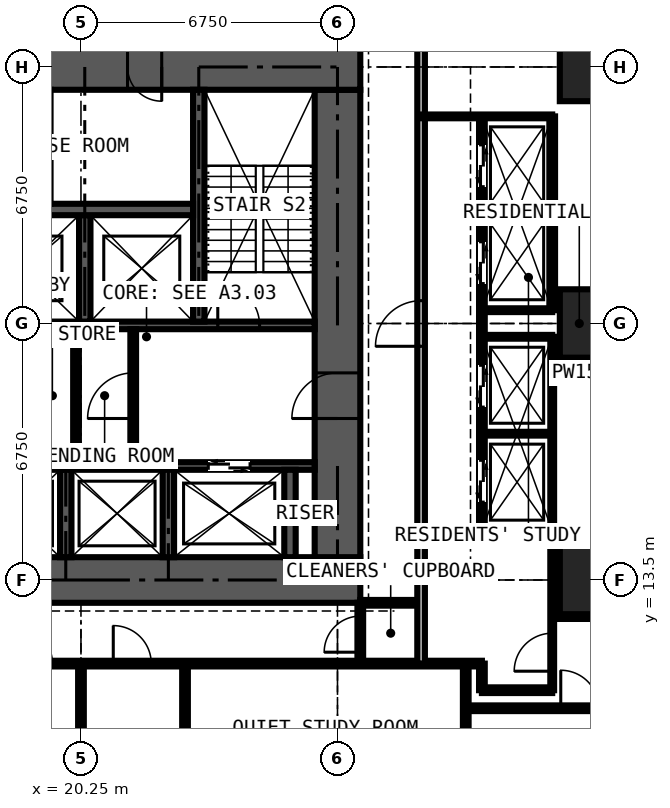
"""IFC4 building model, lengths in metres.
Left out: names, types, materials, properties, quantities, classifications, styles, units other than length and angle.
Written with IfcOpenShell. Run it as: python <this file> out.ifc"""

import sys

from ifc_helpers import new_model, si_unit, direction, frame, frame_2d, origin, origin_2d, place, context, subcontext, project, spatial, rectangle, extrude, element, fill, save


model = new_model("IFC4")
c1 = context("Model", 3, precision=1e-05, world=origin(), true_north=direction((0.0, 1.0)))
c2 = subcontext(c1, "Body", "Model", "MODEL_VIEW")
j1 = project(units=[si_unit("LENGTHUNIT", "METRE"), si_unit("PLANEANGLEUNIT", "RADIAN")], contexts=[c1])
p1 = place(None, origin())
s1 = spatial("IfcSite", under=j1, at=p1, CompositionType="ELEMENT")
p2 = place(p1, origin())
s2 = spatial("IfcBuilding", under=s1, at=p2, CompositionType="ELEMENT")
p3 = place(p2, frame((0.0, 0.0, 57.6)))
s3 = spatial("IfcBuildingStorey", under=s2, at=p3, CompositionType="ELEMENT", Elevation=57.6)
for number, where, z_axis, x_axis in (
    (1, (33.75, 13.5, 0.0), (0.0, 0.0, 1.0), (1.0, 0.0, 0.0)),
    (2, (33.75, 20.25, 0.0), (0.0, 0.0, 1.0), (1.0, 0.0, 0.0)),
    (3, (33.75, 27.0, 0.0), (0.0, 0.0, 1.0), (1.0, 0.0, 0.0)),
):
    element("IfcColumn", number, at=place(p3, frame(where, z_axis=z_axis, x_axis=x_axis)), inside=s3, PredefinedType="COLUMN", context=c2, shape_type="SweptSolid", body=[
        extrude(rectangle(XDim=1.8, YDim=1.8, at=origin_2d()), origin(), (0.0, 0.0, 1.0), 3.6),
    ])
p4 = place(p3, frame((12.9, 13.5, 0.0), z_axis=(0.0, 0.0, 1.0), x_axis=(1.0, 0.0, 0.0)))
e4 = element("IfcWall", 4, at=p4, inside=s3, PredefinedType="SHEAR", context=c2, shape_type="SweptSolid", body=[
    extrude(rectangle(XDim=14.7, YDim=1.2, at=frame_2d((7.35, 0.0))), origin(), (0.0, 0.0, 1.0), 3.6),
])
p5 = place(p3, frame((27.0, 14.1, 0.0), z_axis=(0.0, 0.0, 1.0), x_axis=(0.0, 1.0, 0.0)))
e5 = element("IfcWall", 5, at=p5, inside=s3, PredefinedType="SHEAR", context=c2, shape_type="SweptSolid", body=[
    extrude(rectangle(XDim=12.3, YDim=1.2, at=frame_2d((6.15, 0.0))), origin(), (0.0, 0.0, 1.0), 3.6),
])
p6 = place(p5, frame((3.65, 0.0, 0.0)))
e6 = element("IfcOpeningElement", 6, at=p6, cuts=e5, PredefinedType="OPENING", context=c2, shape_type="SweptSolid", body=[
    extrude(rectangle(XDim=1.2, YDim=2.2, at=frame_2d((0.6, 1.1))), frame((0.0, 0.61, 0.0), z_axis=(0.0, -1.0, 0.0), x_axis=(1.0, 0.0, 0.0)), (0.0, 0.0, 1.0), 1.22),
])
p7 = place(p3, frame((27.6, 27.0, 0.0), z_axis=(0.0, 0.0, 1.0), x_axis=(-1.0, 0.0, 0.0)))
e7 = element("IfcWall", 7, at=p7, inside=s3, PredefinedType="SHEAR", context=c2, shape_type="SweptSolid", body=[
    extrude(rectangle(XDim=14.7, YDim=1.2, at=frame_2d((7.35, 0.0))), origin(), (0.0, 0.0, 1.0), 3.6),
])
p8 = place(p7, frame((5.225, 0.0, 0.0)))
e8 = element("IfcOpeningElement", 8, at=p8, cuts=e7, PredefinedType="OPENING", context=c2, shape_type="SweptSolid", body=[
    extrude(rectangle(XDim=0.9, YDim=2.2, at=frame_2d((0.45, 1.1))), frame((0.0, 0.61, 0.0), z_axis=(0.0, -1.0, 0.0), x_axis=(1.0, 0.0, 0.0)), (0.0, 0.0, 1.0), 1.22),
])
p9 = place(p7, frame((8.2, 0.0, 0.0)))
e9 = element("IfcOpeningElement", 9, at=p9, cuts=e7, PredefinedType="OPENING", context=c2, shape_type="SweptSolid", body=[
    extrude(rectangle(XDim=1.0, YDim=2.2, at=frame_2d((0.5, 1.1))), frame((0.0, 0.61, 0.0), z_axis=(0.0, -1.0, 0.0), x_axis=(1.0, 0.0, 0.0)), (0.0, 0.0, 1.0), 1.22),
])
p10 = place(p3, frame((14.1, 16.5, 0.0), z_axis=(0.0, 0.0, 1.0), x_axis=(1.0, 0.0, 0.0)))
e10 = element("IfcWall", 10, at=p10, inside=s3, PredefinedType="SHEAR", context=c2, shape_type="SweptSolid", body=[
    extrude(rectangle(XDim=12.3, YDim=0.2, at=frame_2d((6.15, 0.0))), origin(), (0.0, 0.0, 1.0), 3.6),
])
p11 = place(p10, frame((0.9, 0.0, 0.0)))
e11 = element("IfcOpeningElement", 11, at=p11, cuts=e10, PredefinedType="OPENING", context=c2, shape_type="SweptSolid", body=[
    extrude(rectangle(XDim=1.1, YDim=2.2, at=frame_2d((0.55, 1.1))), frame((0.0, 0.11, 0.0), z_axis=(0.0, -1.0, 0.0), x_axis=(1.0, 0.0, 0.0)), (0.0, 0.0, 1.0), 0.22),
])
p12 = place(p10, frame((9.5, 0.0, 0.0)))
e12 = element("IfcOpeningElement", 12, at=p12, cuts=e10, PredefinedType="OPENING", context=c2, shape_type="SweptSolid", body=[
    extrude(rectangle(XDim=1.1, YDim=2.2, at=frame_2d((0.55, 1.1))), frame((0.0, 0.11, 0.0), z_axis=(0.0, -1.0, 0.0), x_axis=(1.0, 0.0, 0.0)), (0.0, 0.0, 1.0), 0.22),
])
p13 = place(p3, frame((14.1, 20.2, 0.0), z_axis=(0.0, 0.0, 1.0), x_axis=(1.0, 0.0, 0.0)))
e13 = element("IfcWall", 13, at=p13, inside=s3, PredefinedType="SHEAR", context=c2, shape_type="SweptSolid", body=[
    extrude(rectangle(XDim=12.3, YDim=0.2, at=frame_2d((6.15, 0.0))), origin(), (0.0, 0.0, 1.0), 3.6),
])
p14 = place(p13, frame((0.35, 0.0, 0.0)))
e14 = element("IfcOpeningElement", 14, at=p14, cuts=e13, PredefinedType="OPENING", context=c2, shape_type="SweptSolid", body=[
    extrude(rectangle(XDim=1.1, YDim=2.2, at=frame_2d((0.55, 1.1))), frame((0.0, 0.11, 0.0), z_axis=(0.0, -1.0, 0.0), x_axis=(1.0, 0.0, 0.0)), (0.0, 0.0, 1.0), 0.22),
])
p15 = place(p13, frame((9.75, 0.0, 0.0)))
e15 = element("IfcOpeningElement", 15, at=p15, cuts=e13, PredefinedType="OPENING", context=c2, shape_type="SweptSolid", body=[
    extrude(rectangle(XDim=1.1, YDim=2.2, at=frame_2d((0.55, 1.1))), frame((0.0, 0.11, 0.0), z_axis=(0.0, -1.0, 0.0), x_axis=(1.0, 0.0, 0.0)), (0.0, 0.0, 1.0), 0.22),
])
p16 = place(p3, frame((23.35, 20.3, 0.0), z_axis=(0.0, 0.0, 1.0), x_axis=(0.0, 1.0, 0.0)))
e16 = element("IfcWall", 16, at=p16, inside=s3, PredefinedType="SHEAR", context=c2, shape_type="SweptSolid", body=[
    extrude(rectangle(XDim=6.1, YDim=0.3, at=frame_2d((3.05, 0.0))), origin(), (0.0, 0.0, 1.0), 3.6),
])
p17 = place(p3, frame((20.35, 20.3, 0.0), z_axis=(0.0, 0.0, 1.0), x_axis=(0.0, 1.0, 0.0)))
e17 = element("IfcWall", 17, at=p17, inside=s3, PredefinedType="SHEAR", context=c2, shape_type="SweptSolid", body=[
    extrude(rectangle(XDim=2.8, YDim=0.3, at=frame_2d((1.4, 0.0))), origin(), (0.0, 0.0, 1.0), 3.6),
])
p18 = place(p3, frame((17.3, 23.25, 0.0), z_axis=(0.0, 0.0, 1.0), x_axis=(1.0, 0.0, 0.0)))
e18 = element("IfcWall", 18, at=p18, inside=s3, PredefinedType="SHEAR", context=c2, shape_type="SweptSolid", body=[
    extrude(rectangle(XDim=5.9, YDim=0.3, at=frame_2d((2.95, 0.0))), origin(), (0.0, 0.0, 1.0), 3.6),
])
for number, where, z_axis, x_axis in (
    (19, (19.85, 14.1, 0.0), (0.0, 0.0, 1.0), (0.0, 1.0, 0.0)),
    (20, (22.55, 14.1, 0.0), (0.0, 0.0, 1.0), (0.0, 1.0, 0.0)),
    (21, (25.75, 14.1, 0.0), (0.0, 0.0, 1.0), (0.0, 1.0, 0.0)),
):
    element("IfcWall", number, at=place(p3, frame(where, z_axis=z_axis, x_axis=x_axis)), inside=s3, PredefinedType="SHEAR", context=c2, shape_type="SweptSolid", body=[
        extrude(rectangle(XDim=2.3, YDim=0.3, at=frame_2d((1.15, 0.0))), origin(), (0.0, 0.0, 1.0), 3.6),
    ])
p19 = place(p3, frame((21.625, 16.6, 0.0), z_axis=(0.0, 0.0, 1.0), x_axis=(0.0, 1.0, 0.0)))
e22 = element("IfcWall", 22, at=p19, inside=s3, PredefinedType="PARTITIONING", context=c2, shape_type="SweptSolid", body=[
    extrude(rectangle(XDim=3.5, YDim=0.15, at=frame_2d((1.75, 0.0))), origin(), (0.0, 0.0, 1.0), 3.375),
])
p20 = place(p19, frame((1.15, 0.0, 0.0)))
e23 = element("IfcOpeningElement", 23, at=p20, cuts=e22, PredefinedType="OPENING", context=c2, shape_type="SweptSolid", body=[
    extrude(rectangle(XDim=1.2, YDim=2.2, at=frame_2d((0.6, 1.1))), frame((0.0, 0.085, 0.0), z_axis=(0.0, -1.0, 0.0), x_axis=(1.0, 0.0, 0.0)), (0.0, 0.0, 1.0), 0.17),
])
p21 = place(p3, frame((20.12, 16.6, 0.0), z_axis=(0.0, 0.0, 1.0), x_axis=(0.0, 1.0, 0.0)))
e24 = element("IfcWall", 24, at=p21, inside=s3, PredefinedType="PARTITIONING", context=c2, shape_type="SweptSolid", body=[
    extrude(rectangle(XDim=3.5, YDim=0.15, at=frame_2d((1.75, 0.0))), origin(), (0.0, 0.0, 1.0), 3.375),
])
p22 = place(p3, frame((10.125, 11.3, 0.0), z_axis=(0.0, 0.0, 1.0), x_axis=(1.0, 0.0, 0.0)))
e25 = element("IfcWall", 25, at=p22, inside=s3, PredefinedType="PARTITIONING", context=c2, shape_type="SweptSolid", body=[
    extrude(rectangle(XDim=20.675, YDim=0.15, at=frame_2d((10.337, 0.0))), origin(), (0.0, 0.0, 1.0), 3.375),
])
p23 = place(p22, frame((8.375, 0.0, 0.0)))
e26 = element("IfcOpeningElement", 26, at=p23, cuts=e25, PredefinedType="OPENING", context=c2, shape_type="SweptSolid", body=[
    extrude(rectangle(XDim=1.0, YDim=2.2, at=frame_2d((0.5, 1.1))), frame((0.0, 0.085, 0.0), z_axis=(0.0, -1.0, 0.0), x_axis=(1.0, 0.0, 0.0)), (0.0, 0.0, 1.0), 0.17),
])
p24 = place(p22, frame((10.975, 0.0, 0.0)))
e27 = element("IfcOpeningElement", 27, at=p24, cuts=e25, PredefinedType="OPENING", context=c2, shape_type="SweptSolid", body=[
    extrude(rectangle(XDim=1.0, YDim=2.2, at=frame_2d((0.5, 1.1))), frame((0.0, 0.085, 0.0), z_axis=(0.0, -1.0, 0.0), x_axis=(1.0, 0.0, 0.0)), (0.0, 0.0, 1.0), 0.17),
])
p25 = place(p22, frame((3.925, 0.0, 0.0)))
e28 = element("IfcOpeningElement", 28, at=p25, cuts=e25, PredefinedType="OPENING", context=c2, shape_type="SweptSolid", body=[
    extrude(rectangle(XDim=0.95, YDim=2.2, at=frame_2d((0.475, 1.1))), frame((0.0, 0.085, 0.0), z_axis=(0.0, -1.0, 0.0), x_axis=(1.0, 0.0, 0.0)), (0.0, 0.0, 1.0), 0.17),
])
p26 = place(p3, frame((20.25, -0.734, 0.0), z_axis=(0.0, 0.0, 1.0), x_axis=(0.0, 1.0, 0.0)))
e29 = element("IfcWall", 29, at=p26, inside=s3, PredefinedType="PARTITIONING", context=c2, shape_type="SweptSolid", body=[
    extrude(rectangle(XDim=12.034, YDim=0.15, at=frame_2d((6.017, 0.0))), origin(), (0.0, 0.0, 1.0), 2.61),
])
p27 = place(p3, frame((22.988, 5.65, 0.0), z_axis=(0.0, 0.0, 1.0), x_axis=(0.0, 1.0, 0.0)))
e30 = element("IfcWall", 30, at=p27, inside=s3, PredefinedType="PARTITIONING", context=c2, shape_type="SweptSolid", body=[
    extrude(rectangle(XDim=5.65, YDim=0.15, at=frame_2d((2.825, 0.0))), origin(), (0.0, 0.0, 1.0), 3.375),
])
p28 = place(p3, frame((27.6, 11.3, 0.0), z_axis=(0.0, 0.0, 1.0), x_axis=(0.0, 1.0, 0.0)))
e31 = element("IfcWall", 31, at=p28, inside=s3, PredefinedType="PARTITIONING", context=c2, shape_type="SweptSolid", body=[
    extrude(rectangle(XDim=1.6, YDim=0.15, at=frame_2d((0.8, 0.0))), origin(), (0.0, 0.0, 1.0), 3.375),
])
p29 = place(p28, frame((0.3, 0.0, 0.0)))
e32 = element("IfcOpeningElement", 32, at=p29, cuts=e31, PredefinedType="OPENING", context=c2, shape_type="SweptSolid", body=[
    extrude(rectangle(XDim=0.95, YDim=2.2, at=frame_2d((0.475, 1.1))), frame((0.0, 0.085, 0.0), z_axis=(0.0, -1.0, 0.0), x_axis=(1.0, 0.0, 0.0)), (0.0, 0.0, 1.0), 0.17),
])
p30 = place(p3, frame((27.6, 12.9, 0.0), z_axis=(0.0, 0.0, 1.0), x_axis=(1.0, 0.0, 0.0)))
e33 = element("IfcWall", 33, at=p30, inside=s3, PredefinedType="PARTITIONING", context=c2, shape_type="SweptSolid", body=[
    extrude(rectangle(XDim=1.6, YDim=0.15, at=frame_2d((0.8, 0.0))), origin(), (0.0, 0.0, 1.0), 2.877),
])
p31 = place(p3, frame((29.2, 11.3, 0.0), z_axis=(0.0, 0.0, 1.0), x_axis=(0.0, 1.0, 0.0)))
e34 = element("IfcWall", 34, at=p31, inside=s3, PredefinedType="PARTITIONING", context=c2, shape_type="SweptSolid", body=[
    extrude(rectangle(XDim=17.9, YDim=0.2, at=frame_2d((8.95, 0.0))), origin(), (0.0, 0.0, 1.0), 3.375),
])
p32 = place(p31, frame((8.35, 0.0, 0.0)))
e35 = element("IfcOpeningElement", 35, at=p32, cuts=e34, PredefinedType="OPENING", context=c2, shape_type="SweptSolid", body=[
    extrude(rectangle(XDim=1.2, YDim=2.2, at=frame_2d((0.6, 1.1))), frame((0.0, 0.11, 0.0), z_axis=(0.0, -1.0, 0.0), x_axis=(1.0, 0.0, 0.0)), (0.0, 0.0, 1.0), 0.22),
])
p33 = place(p3, frame((29.2, 25.7, 0.0), z_axis=(0.0, 0.0, 1.0), x_axis=(1.0, 0.0, 0.0)))
e36 = element("IfcWall", 36, at=p33, inside=s3, PredefinedType="SHEAR", context=c2, shape_type="SweptSolid", body=[
    extrude(rectangle(XDim=3.45, YDim=0.1, at=frame_2d((1.725, 0.0))), origin(), (0.0, 0.0, 1.0), 3.375),
])
p34 = place(p3, frame((30.375, -0.734, 0.0), z_axis=(0.0, 0.0, 1.0), x_axis=(0.0, 1.0, 0.0)))
e37 = element("IfcWall", 37, at=p34, inside=s3, PredefinedType="PARTITIONING", context=c2, shape_type="SweptSolid", body=[
    extrude(rectangle(XDim=12.034, YDim=0.15, at=frame_2d((6.017, 0.0))), origin(), (0.0, 0.0, 1.0), 3.375),
])
p35 = place(p3, frame((30.375, 10.125, 0.0), z_axis=(0.0, 0.0, 1.0), x_axis=(1.0, 0.0, 0.0)))
e38 = element("IfcWall", 38, at=p35, inside=s3, PredefinedType="PARTITIONING", context=c2, shape_type="SweptSolid", body=[
    extrude(rectangle(XDim=10.859, YDim=0.15, at=frame_2d((5.429, 0.0))), origin(), (0.0, 0.0, 1.0), 3.375),
])
p36 = place(p35, frame((2.5, 0.0, 0.0)))
e39 = element("IfcOpeningElement", 39, at=p36, cuts=e38, PredefinedType="OPENING", context=c2, shape_type="SweptSolid", body=[
    extrude(rectangle(XDim=1.0, YDim=2.2, at=frame_2d((0.5, 1.1))), frame((0.0, 0.085, 0.0), z_axis=(0.0, -1.0, 0.0), x_axis=(1.0, 0.0, 0.0)), (0.0, 0.0, 1.0), 0.17),
])
p37 = place(p3, frame((30.8, 10.6, 0.0), z_axis=(0.0, 0.0, 1.0), x_axis=(0.0, 1.0, 0.0)))
e40 = element("IfcWall", 40, at=p37, inside=s3, PredefinedType="PARTITIONING", context=c2, shape_type="SweptSolid", body=[
    extrude(rectangle(XDim=0.7, YDim=0.15, at=frame_2d((0.35, 0.0))), origin(), (0.0, 0.0, 1.0), 3.375),
])
p38 = place(p3, frame((30.8, 10.6, 0.0), z_axis=(0.0, 0.0, 1.0), x_axis=(1.0, 0.0, 0.0)))
e41 = element("IfcWall", 41, at=p38, inside=s3, PredefinedType="PARTITIONING", context=c2, shape_type="SweptSolid", body=[
    extrude(rectangle(XDim=1.85, YDim=0.15, at=frame_2d((0.925, 0.0))), origin(), (0.0, 0.0, 1.0), 3.375),
])
p39 = place(p3, frame((30.8, 14.8, 0.0), z_axis=(0.0, 0.0, 1.0), x_axis=(0.0, 1.0, 0.0)))
e42 = element("IfcWall", 42, at=p39, inside=s3, PredefinedType="PARTITIONING", context=c2, shape_type="SweptSolid", body=[
    extrude(rectangle(XDim=10.9, YDim=0.15, at=frame_2d((5.45, 0.0))), origin(), (0.0, 0.0, 1.0), 3.375),
])
p40 = place(p39, frame((0.75, 0.0, 0.0)))
e43 = element("IfcOpeningElement", 43, at=p40, cuts=e42, PredefinedType="OPENING", context=c2, shape_type="SweptSolid", body=[
    extrude(rectangle(XDim=1.1, YDim=2.2, at=frame_2d((0.55, 1.1))), frame((0.0, 0.085, 0.0), z_axis=(0.0, -1.0, 0.0), x_axis=(1.0, 0.0, 0.0)), (0.0, 0.0, 1.0), 0.17),
])
p41 = place(p39, frame((3.25, 0.0, 0.0)))
e44 = element("IfcOpeningElement", 44, at=p41, cuts=e42, PredefinedType="OPENING", context=c2, shape_type="SweptSolid", body=[
    extrude(rectangle(XDim=1.1, YDim=2.2, at=frame_2d((0.55, 1.1))), frame((0.0, 0.085, 0.0), z_axis=(0.0, -1.0, 0.0), x_axis=(1.0, 0.0, 0.0)), (0.0, 0.0, 1.0), 0.17),
])
p42 = place(p39, frame((6.5, 0.0, 0.0)))
e45 = element("IfcOpeningElement", 45, at=p42, cuts=e42, PredefinedType="OPENING", context=c2, shape_type="SweptSolid", body=[
    extrude(rectangle(XDim=1.1, YDim=2.2, at=frame_2d((0.55, 1.1))), frame((0.0, 0.085, 0.0), z_axis=(0.0, -1.0, 0.0), x_axis=(1.0, 0.0, 0.0)), (0.0, 0.0, 1.0), 0.17),
])
p43 = place(p39, frame((9.05, 0.0, 0.0)))
e46 = element("IfcOpeningElement", 46, at=p43, cuts=e42, PredefinedType="OPENING", context=c2, shape_type="SweptSolid", body=[
    extrude(rectangle(XDim=1.1, YDim=2.2, at=frame_2d((0.55, 1.1))), frame((0.0, 0.085, 0.0), z_axis=(0.0, -1.0, 0.0), x_axis=(1.0, 0.0, 0.0)), (0.0, 0.0, 1.0), 0.17),
])
for number, where, z_axis, x_axis in (
    (47, (30.8, 14.8, 0.0), (0.0, 0.0, 1.0), (1.0, 0.0, 0.0)),
    (48, (30.8, 17.35, 0.0), (0.0, 0.0, 1.0), (1.0, 0.0, 0.0)),
    (49, (30.8, 19.9, 0.0), (0.0, 0.0, 1.0), (1.0, 0.0, 0.0)),
    (50, (30.8, 20.6, 0.0), (0.0, 0.0, 1.0), (1.0, 0.0, 0.0)),
    (51, (30.8, 23.15, 0.0), (0.0, 0.0, 1.0), (1.0, 0.0, 0.0)),
):
    element("IfcWall", number, at=place(p3, frame(where, z_axis=z_axis, x_axis=x_axis)), inside=s3, PredefinedType="SHEAR", context=c2, shape_type="SweptSolid", body=[
        extrude(rectangle(XDim=1.85, YDim=0.1, at=frame_2d((0.925, 0.0))), origin(), (0.0, 0.0, 1.0), 3.375),
    ])
p44 = place(p3, frame((32.65, 10.6, 0.0), z_axis=(0.0, 0.0, 1.0), x_axis=(0.0, 1.0, 0.0)))
e52 = element("IfcWall", 52, at=p44, inside=s3, PredefinedType="SHEAR", context=c2, shape_type="SweptSolid", body=[
    extrude(rectangle(XDim=9.3, YDim=0.1, at=frame_2d((4.65, 0.0))), origin(), (0.0, 0.0, 1.0), 3.375),
])
p45 = place(p44, frame((0.5, 0.0, 0.0)))
e53 = element("IfcOpeningElement", 53, at=p45, cuts=e52, PredefinedType="OPENING", context=c2, shape_type="SweptSolid", body=[
    extrude(rectangle(XDim=1.0, YDim=2.2, at=frame_2d((0.5, 1.1))), frame((0.0, 0.06, 0.0), z_axis=(0.0, -1.0, 0.0), x_axis=(1.0, 0.0, 0.0)), (0.0, 0.0, 1.0), 0.12),
])
p46 = place(p3, frame((32.65, 12.55, 0.0), z_axis=(0.0, 0.0, 1.0), x_axis=(1.0, 0.0, 0.0)))
e54 = element("IfcWall", 54, at=p46, inside=s3, PredefinedType="PARTITIONING", context=c2, shape_type="SweptSolid", body=[
    extrude(rectangle(XDim=2.2, YDim=0.15, at=frame_2d((1.1, 0.0))), origin(), (0.0, 0.0, 1.0), 3.375),
])
p47 = place(p3, frame((32.65, 20.6, 0.0), z_axis=(0.0, 0.0, 1.0), x_axis=(0.0, 1.0, 0.0)))
e55 = element("IfcWall", 55, at=p47, inside=s3, PredefinedType="PARTITIONING", context=c2, shape_type="SweptSolid", body=[
    extrude(rectangle(XDim=5.1, YDim=0.15, at=frame_2d((2.55, 0.0))), origin(), (0.0, 0.0, 1.0), 3.375),
])
p48 = place(p12, origin())
e56 = element("IfcDoor", 56, at=p48, inside=s3, OperationType="DOUBLE_DOOR_SLIDING", PredefinedType="DOOR", context=c2, shape_type="SweptSolid", body=[
    extrude(rectangle(XDim=1.1, YDim=2.2, at=frame_2d((0.55, 1.1))), frame((0.0, 0.025, 0.0), z_axis=(0.0, -1.0, 0.0), x_axis=(1.0, 0.0, 0.0)), (0.0, 0.0, 1.0), 0.05),
])
fill(e12, e56)
p49 = place(p6, origin())
e57 = element("IfcDoor", 57, at=p49, inside=s3, OperationType="DOUBLE_DOOR_SINGLE_SWING", PredefinedType="DOOR", context=c2, shape_type="SweptSolid", body=[
    extrude(rectangle(XDim=1.2, YDim=2.2, at=frame_2d((0.6, 1.1))), frame((0.0, 0.025, 0.0), z_axis=(0.0, -1.0, 0.0), x_axis=(1.0, 0.0, 0.0)), (0.0, 0.0, 1.0), 0.05),
])
fill(e6, e57)
p50 = place(p20, origin())
e58 = element("IfcDoor", 58, at=p50, inside=s3, OperationType="DOUBLE_DOOR_SINGLE_SWING", PredefinedType="DOOR", context=c2, shape_type="SweptSolid", body=[
    extrude(rectangle(XDim=1.2, YDim=2.2, at=frame_2d((0.6, 1.1))), frame((0.0, 0.025, 0.0), z_axis=(0.0, -1.0, 0.0), x_axis=(1.0, 0.0, 0.0)), (0.0, 0.0, 1.0), 0.05),
])
fill(e23, e58)
p51 = place(p8, origin())
e59 = element("IfcDoor", 59, at=p51, inside=s3, OperationType="SINGLE_SWING_LEFT", PredefinedType="DOOR", context=c2, shape_type="SweptSolid", body=[
    extrude(rectangle(XDim=0.9, YDim=2.2, at=frame_2d((0.45, 1.1))), frame((0.0, 0.4, 0.0), z_axis=(0.0, -1.0, 0.0), x_axis=(1.0, 0.0, 0.0)), (0.0, 0.0, 1.0), 0.8),
])
fill(e8, e59)
p52 = place(p15, origin())
e60 = element("IfcDoor", 60, at=p52, inside=s3, OperationType="SINGLE_SWING_LEFT", PredefinedType="DOOR", context=c2, shape_type="SweptSolid", body=[
    extrude(rectangle(XDim=1.1, YDim=2.2, at=frame_2d((0.55, 1.1))), frame((0.0, 0.025, 0.0), z_axis=(0.0, -1.0, 0.0), x_axis=(1.0, 0.0, 0.0)), (0.0, 0.0, 1.0), 0.05),
])
fill(e15, e60)
p53 = place(p29, origin())
e61 = element("IfcDoor", 61, at=p53, inside=s3, OperationType="SINGLE_SWING_LEFT", PredefinedType="DOOR", context=c2, shape_type="SweptSolid", body=[
    extrude(rectangle(XDim=0.95, YDim=2.2, at=frame_2d((0.475, 1.1))), frame((0.0, 0.025, 0.0), z_axis=(0.0, -1.0, 0.0), x_axis=(1.0, 0.0, 0.0)), (0.0, 0.0, 1.0), 0.05),
])
fill(e32, e61)
p54 = place(p24, origin())
e62 = element("IfcDoor", 62, at=p54, inside=s3, OperationType="SINGLE_SWING_LEFT", PredefinedType="DOOR", context=c2, shape_type="SweptSolid", body=[
    extrude(rectangle(XDim=1.0, YDim=2.2, at=frame_2d((0.5, 1.1))), frame((0.0, 0.025, 0.0), z_axis=(0.0, -1.0, 0.0), x_axis=(1.0, 0.0, 0.0)), (0.0, 0.0, 1.0), 0.05),
])
fill(e27, e62)
p55 = place(p36, origin())
e63 = element("IfcDoor", 63, at=p55, inside=s3, OperationType="SINGLE_SWING_LEFT", PredefinedType="DOOR", context=c2, shape_type="SweptSolid", body=[
    extrude(rectangle(XDim=1.0, YDim=2.2, at=frame_2d((0.5, 1.1))), frame((0.0, 0.025, 0.0), z_axis=(0.0, -1.0, 0.0), x_axis=(1.0, 0.0, 0.0)), (0.0, 0.0, 1.0), 0.05),
])
fill(e39, e63)
p56 = place(p45, origin())
e64 = element("IfcDoor", 64, at=p56, inside=s3, OperationType="SINGLE_SWING_LEFT", PredefinedType="DOOR", context=c2, shape_type="SweptSolid", body=[
    extrude(rectangle(XDim=1.0, YDim=2.2, at=frame_2d((0.5, 1.1))), frame((0.0, 0.025, 0.0), z_axis=(0.0, -1.0, 0.0), x_axis=(1.0, 0.0, 0.0)), (0.0, 0.0, 1.0), 0.05),
])
fill(e53, e64)
p57 = place(p40, origin())
e65 = element("IfcDoor", 65, at=p57, inside=s3, OperationType="DOUBLE_DOOR_SLIDING", PredefinedType="DOOR", context=c2, shape_type="SweptSolid", body=[
    extrude(rectangle(XDim=1.1, YDim=2.2, at=frame_2d((0.55, 1.1))), frame((0.0, 0.025, 0.0), z_axis=(0.0, -1.0, 0.0), x_axis=(1.0, 0.0, 0.0)), (0.0, 0.0, 1.0), 0.05),
])
fill(e43, e65)
p58 = place(p41, origin())
e66 = element("IfcDoor", 66, at=p58, inside=s3, OperationType="DOUBLE_DOOR_SLIDING", PredefinedType="DOOR", context=c2, shape_type="SweptSolid", body=[
    extrude(rectangle(XDim=1.1, YDim=2.2, at=frame_2d((0.55, 1.1))), frame((0.0, 0.025, 0.0), z_axis=(0.0, -1.0, 0.0), x_axis=(1.0, 0.0, 0.0)), (0.0, 0.0, 1.0), 0.05),
])
fill(e44, e66)
p59 = place(p42, origin())
e67 = element("IfcDoor", 67, at=p59, inside=s3, OperationType="DOUBLE_DOOR_SLIDING", PredefinedType="DOOR", context=c2, shape_type="SweptSolid", body=[
    extrude(rectangle(XDim=1.1, YDim=2.2, at=frame_2d((0.55, 1.1))), frame((0.0, 0.025, 0.0), z_axis=(0.0, -1.0, 0.0), x_axis=(1.0, 0.0, 0.0)), (0.0, 0.0, 1.0), 0.05),
])
fill(e45, e67)
p60 = place(p43, origin())
e68 = element("IfcDoor", 68, at=p60, inside=s3, OperationType="DOUBLE_DOOR_SLIDING", PredefinedType="DOOR", context=c2, shape_type="SweptSolid", body=[
    extrude(rectangle(XDim=1.1, YDim=2.2, at=frame_2d((0.55, 1.1))), frame((0.0, 0.025, 0.0), z_axis=(0.0, -1.0, 0.0), x_axis=(1.0, 0.0, 0.0)), (0.0, 0.0, 1.0), 0.05),
])
fill(e46, e68)
p61 = place(p32, origin())
e69 = element("IfcDoor", 69, at=p61, inside=s3, OperationType="DOUBLE_DOOR_SINGLE_SWING", PredefinedType="DOOR", context=c2, shape_type="SweptSolid", body=[
    extrude(rectangle(XDim=1.2, YDim=2.2, at=frame_2d((0.6, 1.1))), frame((0.0, 0.025, 0.0), z_axis=(0.0, -1.0, 0.0), x_axis=(1.0, 0.0, 0.0)), (0.0, 0.0, 1.0), 0.05),
])
fill(e35, e69)
save(model, sys.argv[1])
